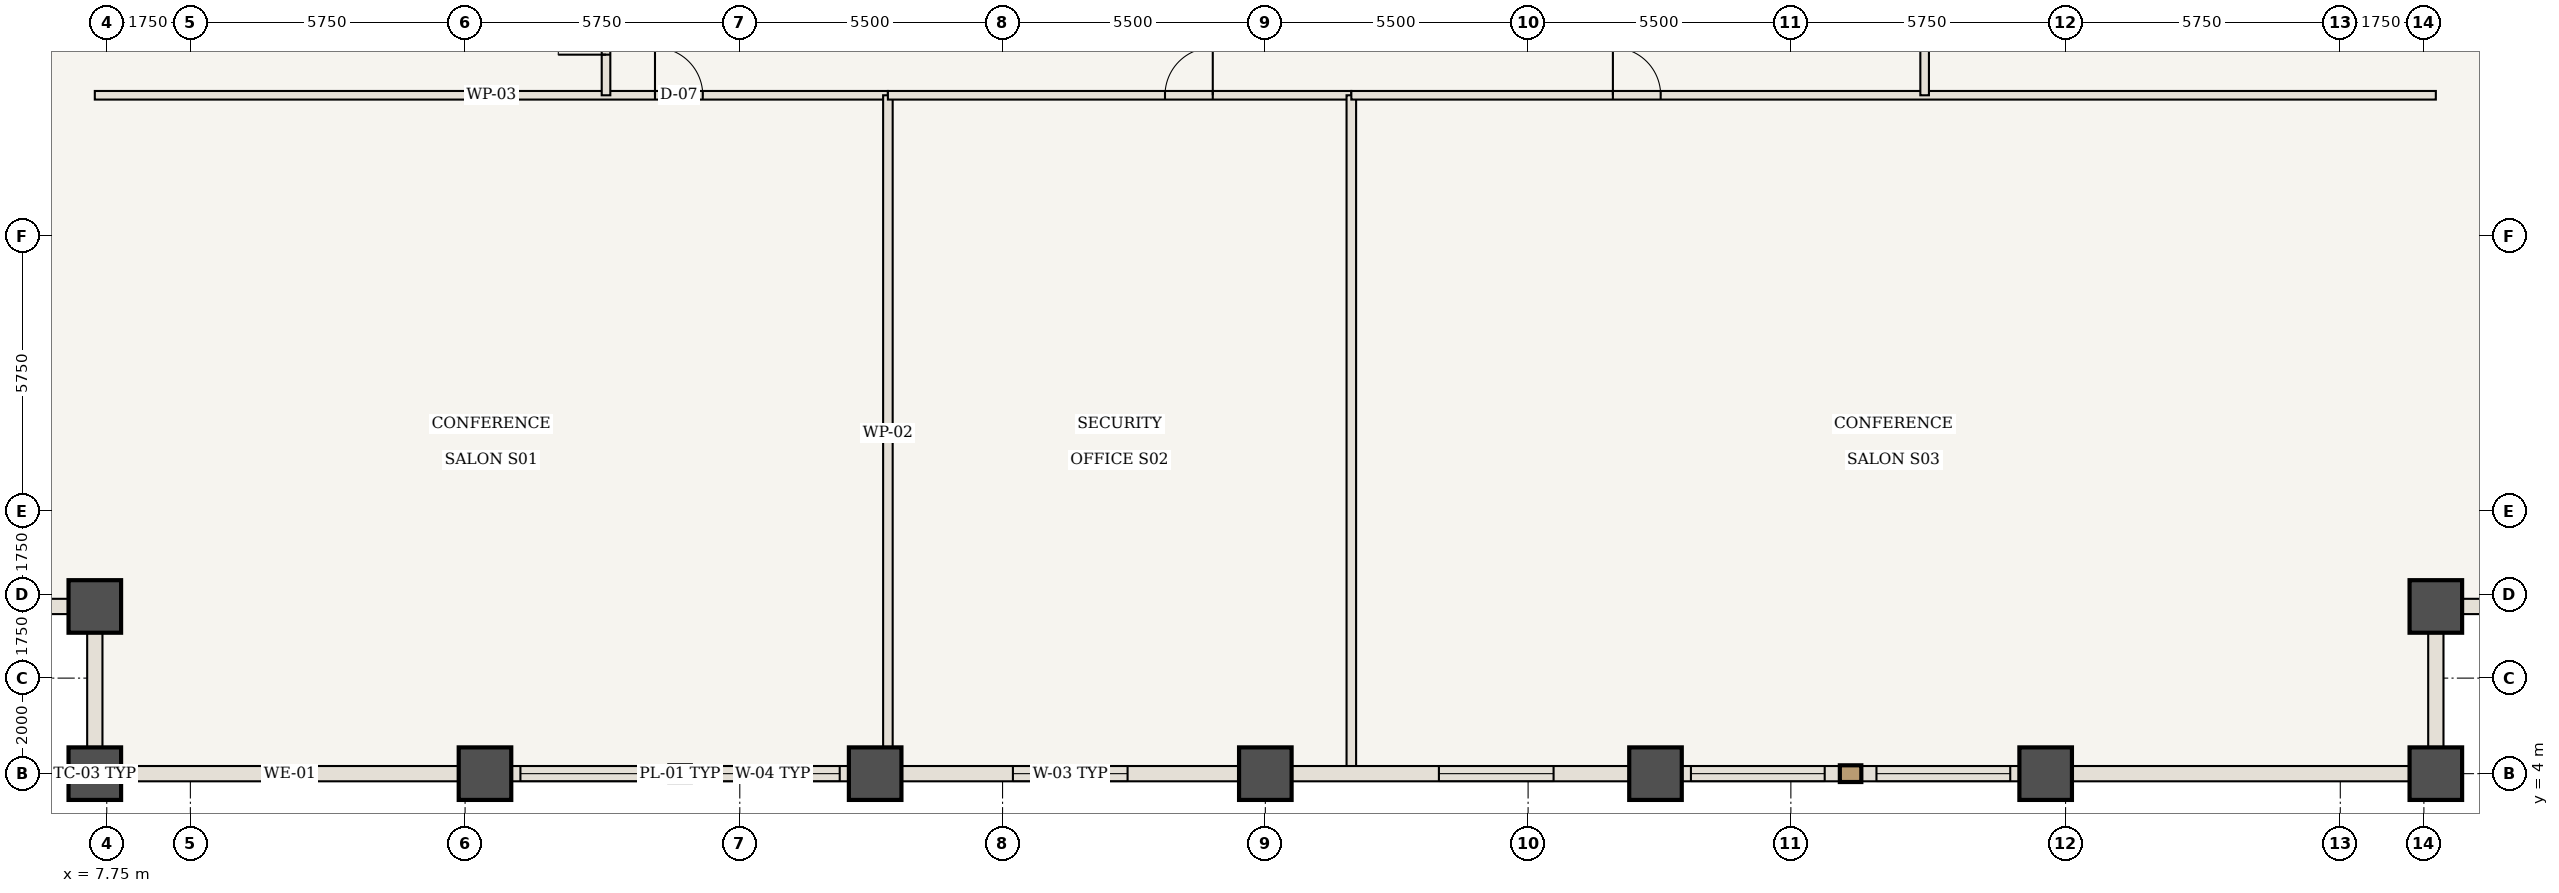
"""IFC4 building model, lengths in metres.
Left out: names, types, materials, properties, quantities, classifications, styles, units other than length and angle.
Written with IfcOpenShell. Run it as: python <this file> out.ifc"""

import sys

from ifc_helpers import new_model, si_unit, direction, frame, frame_2d, origin, origin_2d, place, context, subcontext, project, spatial, rectangle, extrude, element, fill, save


model = new_model("IFC4")
c1 = context("Model", 3, precision=1e-05, world=origin(), true_north=direction((0.0, 1.0)))
c2 = subcontext(c1, "Body", "Model", "MODEL_VIEW")
j1 = project(units=[si_unit("LENGTHUNIT", "METRE"), si_unit("PLANEANGLEUNIT", "RADIAN")], contexts=[c1])
p1 = place(None, origin())
s1 = spatial("IfcSite", under=j1, at=p1, CompositionType="ELEMENT")
p2 = place(p1, origin())
s2 = spatial("IfcBuilding", under=s1, at=p2, CompositionType="ELEMENT")
p3 = place(p2, frame((0.0, 0.0, 89.25)))
s3 = spatial("IfcBuildingStorey", under=s2, at=p3, CompositionType="ELEMENT", Elevation=89.25)
for number, where, z_axis, x_axis in (
    (1, (7.5, 4.0, 0.0), (0.0, 0.0, 1.0), (1.0, 0.0, 0.0)),
    (2, (7.5, 7.5, 0.0), (0.0, 0.0, 1.0), (1.0, 0.0, 0.0)),
    (3, (56.5, 4.0, 0.0), (0.0, 0.0, 1.0), (1.0, 0.0, 0.0)),
    (4, (56.5, 7.5, 0.0), (0.0, 0.0, 1.0), (1.0, 0.0, 0.0)),
    (5, (15.667, 4.0, 0.0), (0.0, 0.0, 1.0), (1.0, 0.0, 0.0)),
    (6, (23.833, 4.0, 0.0), (0.0, 0.0, 1.0), (1.0, 0.0, 0.0)),
    (7, (32.0, 4.0, 0.0), (0.0, 0.0, 1.0), (1.0, 0.0, 0.0)),
    (8, (40.167, 4.0, 0.0), (0.0, 0.0, 1.0), (1.0, 0.0, 0.0)),
    (9, (48.333, 4.0, 0.0), (0.0, 0.0, 1.0), (1.0, 0.0, 0.0)),
):
    element("IfcColumn", number, at=place(p3, frame(where, z_axis=z_axis, x_axis=x_axis)), inside=s3, PredefinedType="COLUMN", context=c2, shape_type="SweptSolid", body=[
        extrude(rectangle(XDim=1.1, YDim=1.1, at=origin_2d()), origin(), (0.0, 0.0, 1.0), 3.5),
    ])
p4 = place(p3, frame((7.5, 18.2, 0.0), z_axis=(0.0, 0.0, 1.0), x_axis=(1.0, 0.0, 0.0)))
e10 = element("IfcWall", 10, at=p4, inside=s3, PredefinedType="STANDARD", context=c2, shape_type="SweptSolid", body=[
    extrude(rectangle(XDim=16.6, YDim=0.18, at=frame_2d((8.3, 0.0))), origin(), (0.0, 0.0, 1.0), 3.32),
])
p5 = place(p4, frame((11.725, 0.0, 0.0)))
e11 = element("IfcOpeningElement", 11, at=p5, cuts=e10, PredefinedType="OPENING", context=c2, shape_type="SweptSolid", body=[
    extrude(rectangle(XDim=1.0, YDim=2.15, at=frame_2d((0.5, 1.075))), frame((0.0, 0.1, 0.0), z_axis=(0.0, -1.0, 0.0), x_axis=(1.0, 0.0, 0.0)), (0.0, 0.0, 1.0), 0.2),
])
p6 = place(p3, frame((24.1, 4.06, 0.0), z_axis=(0.0, 0.0, 1.0), x_axis=(0.0, 1.0, 0.0)))
e12 = element("IfcWall", 12, at=p6, inside=s3, PredefinedType="STANDARD", context=c2, shape_type="SweptSolid", body=[
    extrude(rectangle(XDim=14.14, YDim=0.2, at=frame_2d((7.07, 0.0))), origin(), (0.0, 0.0, 1.0), 3.32),
])
p7 = place(p3, frame((24.1, 18.2, 0.0), z_axis=(0.0, 0.0, 1.0), x_axis=(1.0, 0.0, 0.0)))
e13 = element("IfcWall", 13, at=p7, inside=s3, PredefinedType="STANDARD", context=c2, shape_type="SweptSolid", body=[
    extrude(rectangle(XDim=9.7, YDim=0.18, at=frame_2d((4.85, 0.0))), origin(), (0.0, 0.0, 1.0), 3.32),
])
p8 = place(p7, frame((5.8, 0.0, 0.0)))
e14 = element("IfcOpeningElement", 14, at=p8, cuts=e13, PredefinedType="OPENING", context=c2, shape_type="SweptSolid", body=[
    extrude(rectangle(XDim=1.0, YDim=2.15, at=frame_2d((0.5, 1.075))), frame((0.0, 0.1, 0.0), z_axis=(0.0, -1.0, 0.0), x_axis=(1.0, 0.0, 0.0)), (0.0, 0.0, 1.0), 0.2),
])
p9 = place(p3, frame((33.8, 4.06, 0.0), z_axis=(0.0, 0.0, 1.0), x_axis=(0.0, 1.0, 0.0)))
e15 = element("IfcWall", 15, at=p9, inside=s3, PredefinedType="STANDARD", context=c2, shape_type="SweptSolid", body=[
    extrude(rectangle(XDim=14.14, YDim=0.2, at=frame_2d((7.07, 0.0))), origin(), (0.0, 0.0, 1.0), 3.32),
])
p10 = place(p3, frame((33.8, 18.2, 0.0), z_axis=(0.0, 0.0, 1.0), x_axis=(1.0, 0.0, 0.0)))
e16 = element("IfcWall", 16, at=p10, inside=s3, PredefinedType="STANDARD", context=c2, shape_type="SweptSolid", body=[
    extrude(rectangle(XDim=22.7, YDim=0.18, at=frame_2d((11.35, 0.0))), origin(), (0.0, 0.0, 1.0), 3.32),
])
p11 = place(p10, frame((5.475, 0.0, 0.0)))
e17 = element("IfcOpeningElement", 17, at=p11, cuts=e16, PredefinedType="OPENING", context=c2, shape_type="SweptSolid", body=[
    extrude(rectangle(XDim=1.0, YDim=2.15, at=frame_2d((0.5, 1.075))), frame((0.0, 0.1, 0.0), z_axis=(0.0, -1.0, 0.0), x_axis=(1.0, 0.0, 0.0)), (0.0, 0.0, 1.0), 0.2),
])
p12 = place(p3, frame((18.2, 18.2, 0.0), z_axis=(0.0, 0.0, 1.0), x_axis=(0.0, 1.0, 0.0)))
e18 = element("IfcWall", 18, at=p12, inside=s3, PredefinedType="STANDARD", context=c2, shape_type="SweptSolid", body=[
    extrude(rectangle(XDim=5.6, YDim=0.18, at=frame_2d((2.8, 0.0))), origin(), (0.0, 0.0, 1.0), 3.32),
])
p13 = place(p12, frame((0.85, 0.0, 0.0)))
e19 = element("IfcOpeningElement", 19, at=p13, cuts=e18, PredefinedType="OPENING", context=c2, shape_type="SweptSolid", body=[
    extrude(rectangle(XDim=1.0, YDim=2.15, at=frame_2d((0.5, 1.075))), frame((0.0, 0.1, 0.0), z_axis=(0.0, -1.0, 0.0), x_axis=(1.0, 0.0, 0.0)), (0.0, 0.0, 1.0), 0.2),
])
p14 = place(p3, frame((45.8, 18.2, 0.0), z_axis=(0.0, 0.0, 1.0), x_axis=(0.0, 1.0, 0.0)))
e20 = element("IfcWall", 20, at=p14, inside=s3, PredefinedType="STANDARD", context=c2, shape_type="SweptSolid", body=[
    extrude(rectangle(XDim=8.3, YDim=0.18, at=frame_2d((4.15, 0.0))), origin(), (0.0, 0.0, 1.0), 3.32),
])
p15 = place(p14, frame((3.65, 0.0, 0.0)))
e21 = element("IfcOpeningElement", 21, at=p15, cuts=e20, PredefinedType="OPENING", context=c2, shape_type="SweptSolid", body=[
    extrude(rectangle(XDim=1.0, YDim=2.15, at=frame_2d((0.5, 1.075))), frame((0.0, 0.1, 0.0), z_axis=(0.0, -1.0, 0.0), x_axis=(1.0, 0.0, 0.0)), (0.0, 0.0, 1.0), 0.2),
])
p16 = place(p3, frame((15.667, 4.0, 0.0), z_axis=(0.0, 0.0, 1.0), x_axis=(-1.0, 0.0, 0.0)))
e22 = element("IfcWall", 22, at=p16, inside=s3, PredefinedType="USERDEFINED", context=c2, shape_type="SweptSolid", body=[
    extrude(rectangle(XDim=8.167, YDim=0.32, at=frame_2d((4.083, 0.0))), origin(), (0.0, 0.0, 1.0), 2.52),
])
p17 = place(p3, frame((23.833, 4.0, 0.0), z_axis=(0.0, 0.0, 1.0), x_axis=(-1.0, 0.0, 0.0)))
e23 = element("IfcWall", 23, at=p17, inside=s3, PredefinedType="USERDEFINED", context=c2, shape_type="SweptSolid", body=[
    extrude(rectangle(XDim=8.167, YDim=0.32, at=frame_2d((4.083, 0.0))), origin(), (0.0, 0.0, 1.0), 2.52),
])
p18 = place(p17, frame((0.742, 0.0, 0.85)))
e24 = element("IfcOpeningElement", 24, at=p18, cuts=e23, PredefinedType="OPENING", context=c2, shape_type="SweptSolid", body=[
    extrude(rectangle(XDim=2.8, YDim=1.47, at=frame_2d((1.4, 0.735))), frame((0.0, 0.17, 0.0), z_axis=(0.0, -1.0, 0.0), x_axis=(1.0, 0.0, 0.0)), (0.0, 0.0, 1.0), 0.34),
])
p19 = place(p17, frame((4.625, 0.0, 0.85)))
e25 = element("IfcOpeningElement", 25, at=p19, cuts=e23, PredefinedType="OPENING", context=c2, shape_type="SweptSolid", body=[
    extrude(rectangle(XDim=2.8, YDim=1.47, at=frame_2d((1.4, 0.735))), frame((0.0, 0.17, 0.0), z_axis=(0.0, -1.0, 0.0), x_axis=(1.0, 0.0, 0.0)), (0.0, 0.0, 1.0), 0.34),
])
p20 = place(p3, frame((32.0, 4.0, 0.0), z_axis=(0.0, 0.0, 1.0), x_axis=(-1.0, 0.0, 0.0)))
e26 = element("IfcWall", 26, at=p20, inside=s3, PredefinedType="USERDEFINED", context=c2, shape_type="SweptSolid", body=[
    extrude(rectangle(XDim=8.167, YDim=0.32, at=frame_2d((4.083, 0.0))), origin(), (0.0, 0.0, 1.0), 2.52),
])
p21 = place(p20, frame((2.883, 0.0, 0.85)))
e27 = element("IfcOpeningElement", 27, at=p21, cuts=e26, PredefinedType="OPENING", context=c2, shape_type="SweptSolid", body=[
    extrude(rectangle(XDim=2.4, YDim=1.47, at=frame_2d((1.2, 0.735))), frame((0.0, 0.17, 0.0), z_axis=(0.0, -1.0, 0.0), x_axis=(1.0, 0.0, 0.0)), (0.0, 0.0, 1.0), 0.34),
])
p22 = place(p3, frame((40.167, 4.0, 0.0), z_axis=(0.0, 0.0, 1.0), x_axis=(-1.0, 0.0, 0.0)))
e28 = element("IfcWall", 28, at=p22, inside=s3, PredefinedType="USERDEFINED", context=c2, shape_type="SweptSolid", body=[
    extrude(rectangle(XDim=8.167, YDim=0.32, at=frame_2d((4.083, 0.0))), origin(), (0.0, 0.0, 1.0), 2.52),
])
p23 = place(p22, frame((2.133, 0.0, 0.85)))
e29 = element("IfcOpeningElement", 29, at=p23, cuts=e28, PredefinedType="OPENING", context=c2, shape_type="SweptSolid", body=[
    extrude(rectangle(XDim=2.4, YDim=1.47, at=frame_2d((1.2, 0.735))), frame((0.0, 0.17, 0.0), z_axis=(0.0, -1.0, 0.0), x_axis=(1.0, 0.0, 0.0)), (0.0, 0.0, 1.0), 0.34),
])
p24 = place(p3, frame((48.333, 4.0, 0.0), z_axis=(0.0, 0.0, 1.0), x_axis=(-1.0, 0.0, 0.0)))
e30 = element("IfcWall", 30, at=p24, inside=s3, PredefinedType="USERDEFINED", context=c2, shape_type="SweptSolid", body=[
    extrude(rectangle(XDim=8.167, YDim=0.32, at=frame_2d((4.083, 0.0))), origin(), (0.0, 0.0, 1.0), 2.52),
])
p25 = place(p24, frame((0.742, 0.0, 0.85)))
e31 = element("IfcOpeningElement", 31, at=p25, cuts=e30, PredefinedType="OPENING", context=c2, shape_type="SweptSolid", body=[
    extrude(rectangle(XDim=2.8, YDim=1.47, at=frame_2d((1.4, 0.735))), frame((0.0, 0.17, 0.0), z_axis=(0.0, -1.0, 0.0), x_axis=(1.0, 0.0, 0.0)), (0.0, 0.0, 1.0), 0.34),
])
p26 = place(p24, frame((4.625, 0.0, 0.85)))
e32 = element("IfcOpeningElement", 32, at=p26, cuts=e30, PredefinedType="OPENING", context=c2, shape_type="SweptSolid", body=[
    extrude(rectangle(XDim=2.8, YDim=1.47, at=frame_2d((1.4, 0.735))), frame((0.0, 0.17, 0.0), z_axis=(0.0, -1.0, 0.0), x_axis=(1.0, 0.0, 0.0)), (0.0, 0.0, 1.0), 0.34),
])
p27 = place(p3, frame((56.5, 4.0, 0.0), z_axis=(0.0, 0.0, 1.0), x_axis=(-1.0, 0.0, 0.0)))
e33 = element("IfcWall", 33, at=p27, inside=s3, PredefinedType="USERDEFINED", context=c2, shape_type="SweptSolid", body=[
    extrude(rectangle(XDim=8.167, YDim=0.32, at=frame_2d((4.083, 0.0))), origin(), (0.0, 0.0, 1.0), 2.52),
])
for number, where, z_axis, x_axis in (
    (34, (7.5, 4.0, 0.0), (0.0, 0.0, 1.0), (0.0, 1.0, 0.0)),
    (35, (7.5, 7.5, 0.0), (0.0, 0.0, 1.0), (-1.0, 0.0, 0.0)),
    (36, (56.5, 7.5, 0.0), (0.0, 0.0, 1.0), (0.0, -1.0, 0.0)),
    (37, (60.0, 7.5, 0.0), (0.0, 0.0, 1.0), (-1.0, 0.0, 0.0)),
):
    element("IfcWall", number, at=place(p3, frame(where, z_axis=z_axis, x_axis=x_axis)), inside=s3, PredefinedType="USERDEFINED", context=c2, shape_type="SweptSolid", body=[
        extrude(rectangle(XDim=3.5, YDim=0.32, at=frame_2d((1.75, 0.0))), origin(), (0.0, 0.0, 1.0), 2.52),
    ])
p28 = place(p5, origin())
e38 = element("IfcDoor", 38, at=p28, inside=s3, OperationType="SINGLE_SWING_LEFT", PredefinedType="DOOR", context=c2, shape_type="SweptSolid", body=[
    extrude(rectangle(XDim=1.0, YDim=2.15, at=frame_2d((0.5, 1.075))), frame((0.0, 0.025, 0.0), z_axis=(0.0, -1.0, 0.0), x_axis=(1.0, 0.0, 0.0)), (0.0, 0.0, 1.0), 0.05),
])
fill(e11, e38)
p29 = place(p8, origin())
e39 = element("IfcDoor", 39, at=p29, inside=s3, OperationType="SINGLE_SWING_RIGHT", PredefinedType="DOOR", context=c2, shape_type="SweptSolid", body=[
    extrude(rectangle(XDim=1.0, YDim=2.15, at=frame_2d((0.5, 1.075))), frame((0.0, 0.025, 0.0), z_axis=(0.0, -1.0, 0.0), x_axis=(1.0, 0.0, 0.0)), (0.0, 0.0, 1.0), 0.05),
])
fill(e14, e39)
p30 = place(p11, origin())
e40 = element("IfcDoor", 40, at=p30, inside=s3, OperationType="SINGLE_SWING_LEFT", PredefinedType="DOOR", context=c2, shape_type="SweptSolid", body=[
    extrude(rectangle(XDim=1.0, YDim=2.15, at=frame_2d((0.5, 1.075))), frame((0.0, 0.025, 0.0), z_axis=(0.0, -1.0, 0.0), x_axis=(1.0, 0.0, 0.0)), (0.0, 0.0, 1.0), 0.05),
])
fill(e17, e40)
p31 = place(p13, origin())
e41 = element("IfcDoor", 41, at=p31, inside=s3, OperationType="SINGLE_SWING_LEFT", PredefinedType="DOOR", context=c2, shape_type="SweptSolid", body=[
    extrude(rectangle(XDim=1.0, YDim=2.15, at=frame_2d((0.5, 1.075))), frame((0.0, 0.025, 0.0), z_axis=(0.0, -1.0, 0.0), x_axis=(1.0, 0.0, 0.0)), (0.0, 0.0, 1.0), 0.05),
])
fill(e19, e41)
p32 = place(p18, origin())
e42 = element("IfcWindow", 42, at=p32, inside=s3, PartitioningType="SINGLE_PANEL", PredefinedType="WINDOW", context=c2, shape_type="SweptSolid", body=[
    extrude(rectangle(XDim=2.8, YDim=1.47, at=frame_2d((1.4, 0.735))), frame((0.0, 0.03, 0.0), z_axis=(0.0, -1.0, 0.0), x_axis=(1.0, 0.0, 0.0)), (0.0, 0.0, 1.0), 0.06),
])
fill(e24, e42)
p33 = place(p19, origin())
e43 = element("IfcWindow", 43, at=p33, inside=s3, PartitioningType="SINGLE_PANEL", PredefinedType="WINDOW", context=c2, shape_type="SweptSolid", body=[
    extrude(rectangle(XDim=2.8, YDim=1.47, at=frame_2d((1.4, 0.735))), frame((0.0, 0.03, 0.0), z_axis=(0.0, -1.0, 0.0), x_axis=(1.0, 0.0, 0.0)), (0.0, 0.0, 1.0), 0.06),
])
fill(e25, e43)
p34 = place(p21, origin())
e44 = element("IfcWindow", 44, at=p34, inside=s3, PartitioningType="SINGLE_PANEL", PredefinedType="WINDOW", context=c2, shape_type="SweptSolid", body=[
    extrude(rectangle(XDim=2.4, YDim=1.47, at=frame_2d((1.2, 0.735))), frame((0.0, 0.03, 0.0), z_axis=(0.0, -1.0, 0.0), x_axis=(1.0, 0.0, 0.0)), (0.0, 0.0, 1.0), 0.06),
])
fill(e27, e44)
p35 = place(p23, origin())
e45 = element("IfcWindow", 45, at=p35, inside=s3, PartitioningType="SINGLE_PANEL", PredefinedType="WINDOW", context=c2, shape_type="SweptSolid", body=[
    extrude(rectangle(XDim=2.4, YDim=1.47, at=frame_2d((1.2, 0.735))), frame((0.0, 0.03, 0.0), z_axis=(0.0, -1.0, 0.0), x_axis=(1.0, 0.0, 0.0)), (0.0, 0.0, 1.0), 0.06),
])
fill(e29, e45)
p36 = place(p25, origin())
e46 = element("IfcWindow", 46, at=p36, inside=s3, PartitioningType="SINGLE_PANEL", PredefinedType="WINDOW", context=c2, shape_type="SweptSolid", body=[
    extrude(rectangle(XDim=2.8, YDim=1.47, at=frame_2d((1.4, 0.735))), frame((0.0, 0.03, 0.0), z_axis=(0.0, -1.0, 0.0), x_axis=(1.0, 0.0, 0.0)), (0.0, 0.0, 1.0), 0.06),
])
fill(e31, e46)
p37 = place(p26, origin())
e47 = element("IfcWindow", 47, at=p37, inside=s3, PartitioningType="SINGLE_PANEL", PredefinedType="WINDOW", context=c2, shape_type="SweptSolid", body=[
    extrude(rectangle(XDim=2.8, YDim=1.47, at=frame_2d((1.4, 0.735))), frame((0.0, 0.03, 0.0), z_axis=(0.0, -1.0, 0.0), x_axis=(1.0, 0.0, 0.0)), (0.0, 0.0, 1.0), 0.06),
])
fill(e32, e47)
save(model, sys.argv[1])
